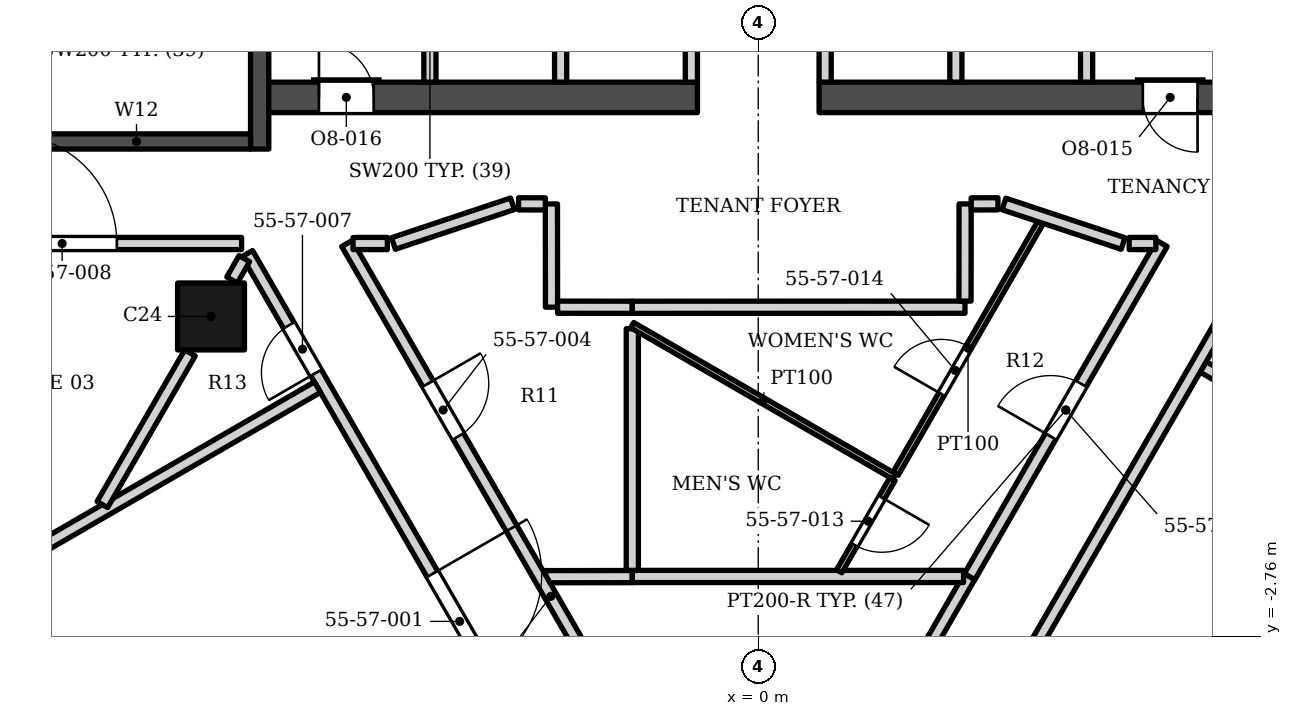
"""IFC4 building model, lengths in metres.
Left out: names, types, materials, properties, quantities, classifications, styles, units other than length and angle.
Written with IfcOpenShell. Run it as: python <this file> out.ifc"""

import sys

from ifc_helpers import new_model, si_unit, direction, frame, frame_2d, origin, origin_2d, place, context, subcontext, project, spatial, rectangle, extrude, element, fill, save


model = new_model("IFC4")
c1 = context("Model", 3, precision=1e-05, world=origin(), true_north=direction((0.0, 1.0)))
c2 = subcontext(c1, "Body", "Model", "MODEL_VIEW")
j1 = project(units=[si_unit("LENGTHUNIT", "METRE"), si_unit("PLANEANGLEUNIT", "RADIAN")], contexts=[c1])
p1 = place(None, origin())
s1 = spatial("IfcSite", under=j1, at=p1, CompositionType="ELEMENT")
p2 = place(p1, origin())
s2 = spatial("IfcBuilding", under=s1, at=p2, CompositionType="ELEMENT")
p3 = place(p2, frame((0.0, 0.0, 231.5)))
s3 = spatial("IfcBuildingStorey", under=s2, at=p3, CompositionType="ELEMENT", Elevation=231.5)
p4 = place(p3, frame((-8.2, 5.253, 0.0), z_axis=(0.0, 0.0, 1.0), x_axis=(0.0, 1.0, 0.0)))
e1 = element("IfcWall", 1, at=p4, inside=s3, PredefinedType="SHEAR", context=c2, shape_type="SweptSolid", body=[
    extrude(rectangle(XDim=13.3, YDim=0.3, at=frame_2d((6.65, 0.0))), origin(), (0.0, 0.0, 1.0), 3.9),
])
p5 = place(p4, frame((7.1, 0.0, 0.0)))
e2 = element("IfcOpeningElement", 2, at=p5, cuts=e1, PredefinedType="OPENING", context=c2, shape_type="SweptSolid", body=[
    extrude(rectangle(XDim=1.4, YDim=2.1, at=frame_2d((0.7, 1.05))), frame((0.0, 0.16, 0.0), z_axis=(0.0, -1.0, 0.0), x_axis=(1.0, 0.0, 0.0)), (0.0, 0.0, 1.0), 0.32),
])
p6 = place(p4, frame((5.05, 0.0, 0.0)))
e3 = element("IfcOpeningElement", 3, at=p6, cuts=e1, PredefinedType="OPENING", context=c2, shape_type="SweptSolid", body=[
    extrude(rectangle(XDim=1.4, YDim=2.1, at=frame_2d((0.7, 1.05))), frame((0.0, 0.16, 0.0), z_axis=(0.0, -1.0, 0.0), x_axis=(1.0, 0.0, 0.0)), (0.0, 0.0, 1.0), 0.32),
])
p7 = place(p3, frame((-12.1, 5.378, 0.0), z_axis=(0.0, 0.0, 1.0), x_axis=(1.0, 0.0, 0.0)))
e4 = element("IfcWall", 4, at=p7, inside=s3, PredefinedType="SHEAR", context=c2, shape_type="SweptSolid", body=[
    extrude(rectangle(XDim=3.75, YDim=0.25, at=frame_2d((1.875, 0.0))), origin(), (0.0, 0.0, 1.0), 3.9),
])
p8 = place(p3, frame((-8.05, 6.103, 0.0), z_axis=(0.0, 0.0, 1.0), x_axis=(1.0, 0.0, 0.0)))
e5 = element("IfcWall", 5, at=p8, inside=s3, PredefinedType="SHEAR", context=c2, shape_type="SweptSolid", body=[
    extrude(rectangle(XDim=7.05, YDim=0.5, at=frame_2d((3.525, 0.0))), origin(), (0.0, 0.0, 1.0), 3.9),
])
p9 = place(p8, frame((0.825, 0.0, 0.0)))
e6 = element("IfcOpeningElement", 6, at=p9, cuts=e5, PredefinedType="OPENING", context=c2, shape_type="SweptSolid", body=[
    extrude(rectangle(XDim=0.9, YDim=2.1, at=frame_2d((0.45, 1.05))), frame((0.0, 0.26, 0.0), z_axis=(0.0, -1.0, 0.0), x_axis=(1.0, 0.0, 0.0)), (0.0, 0.0, 1.0), 0.52),
])
p10 = place(p3, frame((1.0, 6.103, 0.0), z_axis=(0.0, 0.0, 1.0), x_axis=(1.0, 0.0, 0.0)))
e7 = element("IfcWall", 7, at=p10, inside=s3, PredefinedType="SHEAR", context=c2, shape_type="SweptSolid", body=[
    extrude(rectangle(XDim=7.05, YDim=0.5, at=frame_2d((3.525, 0.0))), origin(), (0.0, 0.0, 1.0), 3.9),
])
p11 = place(p10, frame((5.325, 0.0, 0.0)))
e8 = element("IfcOpeningElement", 8, at=p11, cuts=e7, PredefinedType="OPENING", context=c2, shape_type="SweptSolid", body=[
    extrude(rectangle(XDim=0.9, YDim=2.1, at=frame_2d((0.45, 1.05))), frame((0.0, 0.26, 0.0), z_axis=(0.0, -1.0, 0.0), x_axis=(1.0, 0.0, 0.0)), (0.0, 0.0, 1.0), 0.52),
])
p12 = place(p3, frame((-9.0, 2.5, 0.0), z_axis=(0.0, 0.0, 1.0), x_axis=(1.0, 0.0, 0.0)))
e9 = element("IfcColumn", 9, at=p12, inside=s3, PredefinedType="COLUMN", context=c2, shape_type="SweptSolid", body=[
    extrude(rectangle(XDim=1.1, YDim=1.1, at=origin_2d()), origin(), (0.0, 0.0, 1.0), 3.9),
])
p13 = place(p3, frame((-12.973, -2.146, 0.0), z_axis=(0.0, 0.0, 1.0), x_axis=(0.500002543286, -0.866023935413, 0.0)))
e10 = element("IfcWall", 10, at=p13, inside=s3, PredefinedType="ELEMENTEDWALL", context=c2, shape_type="SweptSolid", body=[
    extrude(rectangle(XDim=4.2, YDim=0.2, at=frame_2d((2.1, 0.0))), origin(), (0.0, 0.0, 1.0), 2.974),
])
p14 = place(p13, frame((0.2, 0.0, 0.45)))
e11 = element("IfcOpeningElement", 11, at=p14, cuts=e10, PredefinedType="OPENING", context=c2, shape_type="SweptSolid", body=[
    extrude(rectangle(XDim=2.4, YDim=2.25, at=frame_2d((1.2, 1.125))), frame((0.0, 0.11, 0.0), z_axis=(0.0, -1.0, 0.0), x_axis=(1.0, 0.0, 0.0)), (0.0, 0.0, 1.0), 0.22),
])
p15 = place(p13, frame((2.8, 0.0, 0.0)))
e12 = element("IfcOpeningElement", 12, at=p15, cuts=e10, PredefinedType="OPENING", context=c2, shape_type="SweptSolid", body=[
    extrude(rectangle(XDim=1.2, YDim=2.7, at=frame_2d((0.6, 1.35))), frame((0.0, 0.11, 0.0), z_axis=(0.0, -1.0, 0.0), x_axis=(1.0, 0.0, 0.0)), (0.0, 0.0, 1.0), 0.22),
])
for number, where, z_axis, x_axis in (
    (13, (-5.4, 6.353, 0.0), (0.0, 0.0, 1.0), (0.0, 1.0, 0.0)),
    (14, (-3.25, 6.353, 0.0), (0.0, 0.0, 1.0), (0.0, 1.0, 0.0)),
    (15, (-1.1, 6.353, 0.0), (0.0, 0.0, 1.0), (0.0, 1.0, 0.0)),
    (16, (1.1, 6.353, 0.0), (0.0, 0.0, 1.0), (0.0, 1.0, 0.0)),
    (17, (3.25, 6.353, 0.0), (0.0, 0.0, 1.0), (0.0, 1.0, 0.0)),
    (18, (5.4, 6.353, 0.0), (0.0, 0.0, 1.0), (0.0, 1.0, 0.0)),
):
    element("IfcWall", number, at=place(p3, frame(where, z_axis=z_axis, x_axis=x_axis)), inside=s3, PredefinedType="SOLIDWALL", context=c2, shape_type="SweptSolid", body=[
        extrude(rectangle(XDim=2.5, YDim=0.2, at=frame_2d((1.25, 0.0))), origin(), (0.0, 0.0, 1.0), 3.73),
    ])
p16 = place(p3, frame((-8.403, 3.534, 0.0), z_axis=(0.0, 0.0, 1.0), x_axis=(0.499994899308, -0.86602834865, 0.0)))
e19 = element("IfcWall", 19, at=p16, inside=s3, PredefinedType="PARTITIONING", context=c2, shape_type="SweptSolid", body=[
    extrude(rectangle(XDim=16.677, YDim=0.2, at=frame_2d((8.339, 0.0))), origin(), (0.0, 0.0, 1.0), 2.742),
])
p17 = place(p16, frame((6.084, 0.0, 0.0)))
e20 = element("IfcOpeningElement", 20, at=p17, cuts=e19, PredefinedType="OPENING", context=c2, shape_type="SweptSolid", body=[
    extrude(rectangle(XDim=1.8, YDim=2.4, at=frame_2d((0.9, 1.2))), frame((0.0, 0.11, 0.0), z_axis=(0.0, -1.0, 0.0), x_axis=(1.0, 0.0, 0.0)), (0.0, 0.0, 1.0), 0.22),
])
p18 = place(p16, frame((13.285, 0.0, 0.0)))
e21 = element("IfcOpeningElement", 21, at=p18, cuts=e19, PredefinedType="OPENING", context=c2, shape_type="SweptSolid", body=[
    extrude(rectangle(XDim=0.9, YDim=2.1, at=frame_2d((0.45, 1.05))), frame((0.0, 0.11, 0.0), z_axis=(0.0, -1.0, 0.0), x_axis=(1.0, 0.0, 0.0)), (0.0, 0.0, 1.0), 0.22),
])
p19 = place(p16, frame((1.364, 0.0, 0.0)))
e22 = element("IfcOpeningElement", 22, at=p19, cuts=e19, PredefinedType="OPENING", context=c2, shape_type="SweptSolid", body=[
    extrude(rectangle(XDim=0.9, YDim=2.1, at=frame_2d((0.45, 1.05))), frame((0.0, 0.11, 0.0), z_axis=(0.0, -1.0, 0.0), x_axis=(1.0, 0.0, 0.0)), (0.0, 0.0, 1.0), 0.22),
])
p20 = place(p3, frame((-0.013, -7.821, 0.0), z_axis=(0.0, 0.0, 1.0), x_axis=(0.499774962009, 0.866155290551, 0.0)))
e23 = element("IfcWall", 23, at=p20, inside=s3, PredefinedType="PARTITIONING", context=c2, shape_type="SweptSolid", body=[
    extrude(rectangle(XDim=6.977, YDim=0.2, at=frame_2d((3.488, 0.0))), origin(), (0.0, 0.0, 1.0), 2.742),
])
p21 = place(p20, frame((2.989, 0.0, 0.0)))
e24 = element("IfcOpeningElement", 24, at=p21, cuts=e23, PredefinedType="OPENING", context=c2, shape_type="SweptSolid", body=[
    extrude(rectangle(XDim=0.9, YDim=2.1, at=frame_2d((0.45, 1.05))), frame((0.0, 0.11, 0.0), z_axis=(0.0, -1.0, 0.0), x_axis=(1.0, 0.0, 0.0)), (0.0, 0.0, 1.0), 0.22),
])
p22 = place(p3, frame((-12.659, -1.791, 0.0), z_axis=(0.0, 0.0, 1.0), x_axis=(0.865661558062, 0.500629670408, 0.0)))
e25 = element("IfcWall", 25, at=p22, inside=s3, PredefinedType="PARTITIONING", context=c2, shape_type="SweptSolid", body=[
    extrude(rectangle(XDim=6.25, YDim=0.2, at=frame_2d((3.125, 0.0))), origin(), (0.0, 0.0, 1.0), 2.884),
])
p23 = place(p3, frame((-3.499, -1.78, 0.0), z_axis=(0.0, 0.0, 1.0), x_axis=(0.999999471866, 0.001027748686, 0.0)))
e26 = element("IfcWall", 26, at=p23, inside=s3, PredefinedType="PARTITIONING", context=c2, shape_type="SweptSolid", body=[
    extrude(rectangle(XDim=1.425, YDim=0.2, at=frame_2d((0.713, 0.0))), origin(), (0.0, 0.0, 1.0), 3.73),
])
p24 = place(p3, frame((-2.071, -1.776, 0.0), z_axis=(0.0, 0.0, 1.0), x_axis=(1.0, 0.0, 0.0)))
e27 = element("IfcWall", 27, at=p24, inside=s3, PredefinedType="PARTITIONING", context=c2, shape_type="SweptSolid", body=[
    extrude(rectangle(XDim=5.448, YDim=0.2, at=frame_2d((2.724, 0.0))), origin(), (0.0, 0.0, 1.0), 2.742),
])
p25 = place(p3, frame((3.476, -1.778, 0.0), z_axis=(0.0, 0.0, 1.0), x_axis=(0.500016482634, 0.866015887322, 0.0)))
e28 = element("IfcWall", 28, at=p25, inside=s3, PredefinedType="PARTITIONING", context=c2, shape_type="SweptSolid", body=[
    extrude(rectangle(XDim=6.325, YDim=0.2, at=frame_2d((3.163, 0.0))), origin(), (0.0, 0.0, 1.0), 2.742),
])
p26 = place(p25, frame((2.663, 0.0, 0.0)))
e29 = element("IfcOpeningElement", 29, at=p26, cuts=e28, PredefinedType="OPENING", context=c2, shape_type="SweptSolid", body=[
    extrude(rectangle(XDim=1.0, YDim=2.1, at=frame_2d((0.5, 1.05))), frame((0.0, 0.11, 0.0), z_axis=(0.0, -1.0, 0.0), x_axis=(1.0, 0.0, 0.0)), (0.0, 0.0, 1.0), 0.22),
])
p27 = place(p3, frame((7.316, 1.671, 0.0), z_axis=(0.0, 0.0, 1.0), x_axis=(0.866023543838, -0.500003221507, 0.0)))
e30 = element("IfcWall", 30, at=p27, inside=s3, PredefinedType="PARTITIONING", context=c2, shape_type="SweptSolid", body=[
    extrude(rectangle(XDim=6.85, YDim=0.2, at=frame_2d((3.425, 0.0))), origin(), (0.0, 0.0, 1.0), 2.884),
])
p28 = place(p3, frame((1.331, -1.691, 0.0), z_axis=(0.0, 0.0, 1.0), x_axis=(0.500723196883, 0.865607463059, 0.0)))
e31 = element("IfcWall", 31, at=p28, inside=s3, PredefinedType="PARTITIONING", context=c2, shape_type="SweptSolid", body=[
    extrude(rectangle(XDim=1.752, YDim=0.1, at=frame_2d((0.876, 0.0))), origin(), (0.0, 0.0, 1.0), 2.742),
])
p29 = place(p28, frame((0.502, 0.0, 0.0)))
e32 = element("IfcOpeningElement", 32, at=p29, cuts=e31, PredefinedType="OPENING", context=c2, shape_type="SweptSolid", body=[
    extrude(rectangle(XDim=0.9, YDim=2.1, at=frame_2d((0.45, 1.05))), frame((0.0, 0.06, 0.0), z_axis=(0.0, -1.0, 0.0), x_axis=(1.0, 0.0, 0.0)), (0.0, 0.0, 1.0), 0.12),
])
p30 = place(p3, frame((-10.787, -0.594, 0.0), z_axis=(0.0, 0.0, 1.0), x_axis=(0.500287485194, 0.865859360496, 0.0)))
e33 = element("IfcWall", 33, at=p30, inside=s3, PredefinedType="PARTITIONING", context=c2, shape_type="SweptSolid", body=[
    extrude(rectangle(XDim=2.88, YDim=0.2, at=frame_2d((1.44, 0.0))), origin(), (0.0, 0.0, 1.0), 3.73),
])
p31 = place(p3, frame((2.258, -0.087, 0.0), z_axis=(0.0, 0.0, 1.0), x_axis=(0.499684056676, 0.866207736922, 0.0)))
e34 = element("IfcWall", 34, at=p31, inside=s3, PredefinedType="PARTITIONING", context=c2, shape_type="SweptSolid", body=[
    extrude(rectangle(XDim=4.771, YDim=0.1, at=frame_2d((2.385, 0.0))), origin(), (0.0, 0.0, 1.0), 2.742),
])
p32 = place(p31, frame((1.513, 0.0, 0.0)))
e35 = element("IfcOpeningElement", 35, at=p32, cuts=e34, PredefinedType="OPENING", context=c2, shape_type="SweptSolid", body=[
    extrude(rectangle(XDim=0.9, YDim=2.1, at=frame_2d((0.45, 1.05))), frame((0.0, 0.06, 0.0), z_axis=(0.0, -1.0, 0.0), x_axis=(1.0, 0.0, 0.0)), (0.0, 0.0, 1.0), 0.12),
])
p33 = place(p3, frame((-2.071, -1.676, 0.0), z_axis=(0.0, 0.0, 1.0), x_axis=(0.0, 1.0, 0.0)))
e36 = element("IfcWall", 36, at=p33, inside=s3, PredefinedType="PARTITIONING", context=c2, shape_type="SweptSolid", body=[
    extrude(rectangle(XDim=3.975, YDim=0.2, at=frame_2d((1.987, 0.0))), origin(), (0.0, 0.0, 1.0), 2.742),
])
p34 = place(p3, frame((-2.073, 2.357, 0.0), z_axis=(0.0, 0.0, 1.0), x_axis=(0.865852787501, -0.500298861059, 0.0)))
e37 = element("IfcWall", 37, at=p34, inside=s3, PredefinedType="PARTITIONING", context=c2, shape_type="SweptSolid", body=[
    extrude(rectangle(XDim=4.974, YDim=0.1, at=frame_2d((2.487, 0.0))), origin(), (0.0, 0.0, 1.0), 2.742),
])
p35 = place(p3, frame((-3.402, 4.351, 0.0), z_axis=(0.0, 0.0, 1.0), x_axis=(0.001150085496, -0.999999338651, 0.0)))
e38 = element("IfcWall", 38, at=p35, inside=s3, PredefinedType="PARTITIONING", context=c2, shape_type="SweptSolid", body=[
    extrude(rectangle(XDim=1.698, YDim=0.2, at=frame_2d((0.849, 0.0))), origin(), (0.0, 0.0, 1.0), 3.73),
])
p36 = place(p3, frame((-3.3, 2.652, 0.0), z_axis=(0.0, 0.0, 1.0), x_axis=(0.999999030114, -0.001392756309, 0.0)))
e39 = element("IfcWall", 39, at=p36, inside=s3, PredefinedType="PARTITIONING", context=c2, shape_type="SweptSolid", body=[
    extrude(rectangle(XDim=1.227, YDim=0.2, at=frame_2d((0.614, 0.0))), origin(), (0.0, 0.0, 1.0), 3.73),
])
p37 = place(p3, frame((-2.071, 2.651, 0.0), z_axis=(0.0, 0.0, 1.0), x_axis=(0.99999995122, 0.0003123466, 0.0)))
e40 = element("IfcWall", 40, at=p37, inside=s3, PredefinedType="PARTITIONING", context=c2, shape_type="SweptSolid", body=[
    extrude(rectangle(XDim=5.471, YDim=0.2, at=frame_2d((2.736, 0.0))), origin(), (0.0, 0.0, 1.0), 3.73),
])
p38 = place(p3, frame((-8.654, 3.1, 0.0), z_axis=(0.0, 0.0, 1.0), x_axis=(0.497766425922, 0.86731112366, 0.0)))
e41 = element("IfcWall", 41, at=p38, inside=s3, PredefinedType="PARTITIONING", context=c2, shape_type="SweptSolid", body=[
    extrude(rectangle(XDim=0.404, YDim=0.2, at=frame_2d((0.202, 0.0))), origin(), (0.0, 0.0, 1.0), 3.73),
])
p39 = place(p3, frame((-14.4, 3.699, 0.0), z_axis=(0.0, 0.0, 1.0), x_axis=(1.0, 0.0, 0.0)))
e42 = element("IfcWall", 42, at=p39, inside=s3, PredefinedType="PARTITIONING", context=c2, shape_type="SweptSolid", body=[
    extrude(rectangle(XDim=5.903, YDim=0.2, at=frame_2d((2.952, 0.0))), origin(), (0.0, 0.0, 1.0), 2.974),
])
p40 = place(p39, frame((2.052, 0.0, 0.0)))
e43 = element("IfcOpeningElement", 43, at=p40, cuts=e42, PredefinedType="OPENING", context=c2, shape_type="SweptSolid", body=[
    extrude(rectangle(XDim=1.8, YDim=2.4, at=frame_2d((0.9, 1.2))), frame((0.0, 0.11, 0.0), z_axis=(0.0, -1.0, 0.0), x_axis=(1.0, 0.0, 0.0)), (0.0, 0.0, 1.0), 0.22),
])
p41 = place(p3, frame((-6.764, 3.7, 0.0), z_axis=(0.0, 0.0, 1.0), x_axis=(0.500260603275, -0.865874892124, 0.0)))
e44 = element("IfcWall", 44, at=p41, inside=s3, PredefinedType="PARTITIONING", context=c2, shape_type="SweptSolid", body=[
    extrude(rectangle(XDim=13.403, YDim=0.2, at=frame_2d((6.702, 0.0))), origin(), (0.0, 0.0, 1.0), 2.742),
])
p42 = place(p41, frame((2.663, 0.0, 0.0)))
e45 = element("IfcOpeningElement", 45, at=p42, cuts=e44, PredefinedType="OPENING", context=c2, shape_type="SweptSolid", body=[
    extrude(rectangle(XDim=1.0, YDim=2.1, at=frame_2d((0.5, 1.05))), frame((0.0, 0.11, 0.0), z_axis=(0.0, -1.0, 0.0), x_axis=(1.0, 0.0, 0.0)), (0.0, 0.0, 1.0), 0.22),
])
p43 = place(p3, frame((-6.664, 3.7, 0.0), z_axis=(0.0, 0.0, 1.0), x_axis=(1.0, 0.0, 0.0)))
e46 = element("IfcWall", 46, at=p43, inside=s3, PredefinedType="PARTITIONING", context=c2, shape_type="SweptSolid", body=[
    extrude(rectangle(XDim=0.564, YDim=0.2, at=frame_2d((0.282, 0.0))), origin(), (0.0, 0.0, 1.0), 2.742),
])
p44 = place(p3, frame((4.042, 4.35, 0.0), z_axis=(0.0, 0.0, 1.0), x_axis=(0.949072993984, -0.315056268135, 0.0)))
e47 = element("IfcWall", 47, at=p44, inside=s3, PredefinedType="PARTITIONING", context=c2, shape_type="SweptSolid", body=[
    extrude(rectangle(XDim=2.063, YDim=0.2, at=frame_2d((1.032, 0.0))), origin(), (0.0, 0.0, 1.0), 2.742),
])
p45 = place(p3, frame((6.1, 3.7, 0.0), z_axis=(0.0, 0.0, 1.0), x_axis=(1.0, 0.0, 0.0)))
e48 = element("IfcWall", 48, at=p45, inside=s3, PredefinedType="PARTITIONING", context=c2, shape_type="SweptSolid", body=[
    extrude(rectangle(XDim=0.439, YDim=0.2, at=frame_2d((0.219, 0.0))), origin(), (0.0, 0.0, 1.0), 3.73),
])
p46 = place(p3, frame((0.48, -9.972, 0.0), z_axis=(0.0, 0.0, 1.0), x_axis=(0.499998248741, 0.866026414872, 0.0)))
e49 = element("IfcWall", 49, at=p46, inside=s3, PredefinedType="PARTITIONING", context=c2, shape_type="SweptSolid", body=[
    extrude(rectangle(XDim=15.785, YDim=0.2, at=frame_2d((7.893, 0.0))), origin(), (0.0, 0.0, 1.0), 2.742),
])
p47 = place(p46, frame((5.85, 0.0, 0.0)))
e50 = element("IfcOpeningElement", 50, at=p47, cuts=e49, PredefinedType="OPENING", context=c2, shape_type="SweptSolid", body=[
    extrude(rectangle(XDim=1.8, YDim=2.4, at=frame_2d((0.9, 1.2))), frame((0.0, 0.11, 0.0), z_axis=(0.0, -1.0, 0.0), x_axis=(1.0, 0.0, 0.0)), (0.0, 0.0, 1.0), 0.22),
])
p48 = place(p3, frame((-6.0, 3.7, 0.0), z_axis=(0.0, 0.0, 1.0), x_axis=(0.948683298051, 0.316227766017, 0.0)))
e51 = element("IfcWall", 51, at=p48, inside=s3, PredefinedType="PARTITIONING", context=c2, shape_type="SweptSolid", body=[
    extrude(rectangle(XDim=2.064, YDim=0.2, at=frame_2d((1.032, 0.0))), origin(), (0.0, 0.0, 1.0), 2.742),
])
p49 = place(p3, frame((-3.942, 4.352, 0.0), z_axis=(0.0, 0.0, 1.0), x_axis=(0.999996159087, -0.00277160798, 0.0)))
e52 = element("IfcWall", 52, at=p49, inside=s3, PredefinedType="PARTITIONING", context=c2, shape_type="SweptSolid", body=[
    extrude(rectangle(XDim=0.44, YDim=0.2, at=frame_2d((0.22, 0.0))), origin(), (0.0, 0.0, 1.0), 3.73),
])
p50 = place(p3, frame((3.4, 2.752, 0.0), z_axis=(0.0, 0.0, 1.0), x_axis=(0.001222119466, 0.999999253212, 0.0)))
e53 = element("IfcWall", 53, at=p50, inside=s3, PredefinedType="PARTITIONING", context=c2, shape_type="SweptSolid", body=[
    extrude(rectangle(XDim=1.598, YDim=0.2, at=frame_2d((0.799, 0.0))), origin(), (0.0, 0.0, 1.0), 3.73),
])
p51 = place(p3, frame((3.502, 4.351, 0.0), z_axis=(0.0, 0.0, 1.0), x_axis=(0.999996159087, 0.00277160798, 0.0)))
e54 = element("IfcWall", 54, at=p51, inside=s3, PredefinedType="PARTITIONING", context=c2, shape_type="SweptSolid", body=[
    extrude(rectangle(XDim=0.44, YDim=0.2, at=frame_2d((0.22, 0.0))), origin(), (0.0, 0.0, 1.0), 3.73),
])
p52 = place(p9, origin())
e55 = element("IfcDoor", 55, at=p52, inside=s3, OperationType="SINGLE_SWING_LEFT", PredefinedType="DOOR", context=c2, shape_type="SweptSolid", body=[
    extrude(rectangle(XDim=0.9, YDim=2.1, at=frame_2d((0.45, 1.05))), frame((0.0, 0.025, 0.0), z_axis=(0.0, -1.0, 0.0), x_axis=(1.0, 0.0, 0.0)), (0.0, 0.0, 1.0), 0.05),
])
fill(e6, e55)
p53 = place(p11, origin())
e56 = element("IfcDoor", 56, at=p53, inside=s3, OperationType="SINGLE_SWING_RIGHT", PredefinedType="DOOR", context=c2, shape_type="SweptSolid", body=[
    extrude(rectangle(XDim=0.9, YDim=2.1, at=frame_2d((0.45, 1.05))), frame((0.0, 0.025, 0.0), z_axis=(0.0, -1.0, 0.0), x_axis=(1.0, 0.0, 0.0)), (0.0, 0.0, 1.0), 0.05),
])
fill(e8, e56)
p54 = place(p17, origin())
e57 = element("IfcDoor", 57, at=p54, inside=s3, OperationType="DOUBLE_DOOR_SINGLE_SWING", PredefinedType="DOOR", context=c2, shape_type="SweptSolid", body=[
    extrude(rectangle(XDim=1.8, YDim=2.4, at=frame_2d((0.9, 1.2))), frame((0.0, 0.025, 0.0), z_axis=(0.0, -1.0, 0.0), x_axis=(1.0, 0.0, 0.0)), (0.0, 0.0, 1.0), 0.05),
])
fill(e20, e57)
p55 = place(p42, origin())
e58 = element("IfcDoor", 58, at=p55, inside=s3, OperationType="SINGLE_SWING_LEFT", PredefinedType="DOOR", context=c2, shape_type="SweptSolid", body=[
    extrude(rectangle(XDim=1.0, YDim=2.1, at=frame_2d((0.5, 1.05))), frame((0.0, 0.025, 0.0), z_axis=(0.0, -1.0, 0.0), x_axis=(1.0, 0.0, 0.0)), (0.0, 0.0, 1.0), 0.05),
])
fill(e45, e58)
p56 = place(p19, origin())
e59 = element("IfcDoor", 59, at=p56, inside=s3, OperationType="SINGLE_SWING_RIGHT", PredefinedType="DOOR", context=c2, shape_type="SweptSolid", body=[
    extrude(rectangle(XDim=0.9, YDim=2.1, at=frame_2d((0.45, 1.05))), frame((0.0, 0.025, 0.0), z_axis=(0.0, -1.0, 0.0), x_axis=(1.0, 0.0, 0.0)), (0.0, 0.0, 1.0), 0.05),
])
fill(e22, e59)
p57 = place(p40, origin())
e60 = element("IfcDoor", 60, at=p57, inside=s3, OperationType="DOUBLE_DOOR_SINGLE_SWING", PredefinedType="DOOR", context=c2, shape_type="SweptSolid", body=[
    extrude(rectangle(XDim=1.8, YDim=2.4, at=frame_2d((0.9, 1.2))), frame((0.0, 0.025, 0.0), z_axis=(0.0, -1.0, 0.0), x_axis=(1.0, 0.0, 0.0)), (0.0, 0.0, 1.0), 0.05),
])
fill(e43, e60)
p58 = place(p26, origin())
e61 = element("IfcDoor", 61, at=p58, inside=s3, OperationType="SINGLE_SWING_LEFT", PredefinedType="DOOR", context=c2, shape_type="SweptSolid", body=[
    extrude(rectangle(XDim=1.0, YDim=2.1, at=frame_2d((0.5, 1.05))), frame((0.0, 0.025, 0.0), z_axis=(0.0, -1.0, 0.0), x_axis=(1.0, 0.0, 0.0)), (0.0, 0.0, 1.0), 0.05),
])
fill(e29, e61)
p59 = place(p29, origin())
e62 = element("IfcDoor", 62, at=p59, inside=s3, OperationType="SINGLE_SWING_RIGHT", PredefinedType="DOOR", context=c2, shape_type="SweptSolid", body=[
    extrude(rectangle(XDim=0.9, YDim=2.1, at=frame_2d((0.45, 1.05))), frame((0.0, 0.025, 0.0), z_axis=(0.0, -1.0, 0.0), x_axis=(1.0, 0.0, 0.0)), (0.0, 0.0, 1.0), 0.05),
])
fill(e32, e62)
p60 = place(p32, origin())
e63 = element("IfcDoor", 63, at=p60, inside=s3, OperationType="SINGLE_SWING_LEFT", PredefinedType="DOOR", context=c2, shape_type="SweptSolid", body=[
    extrude(rectangle(XDim=0.9, YDim=2.1, at=frame_2d((0.45, 1.05))), frame((0.0, 0.025, 0.0), z_axis=(0.0, -1.0, 0.0), x_axis=(1.0, 0.0, 0.0)), (0.0, 0.0, 1.0), 0.05),
])
fill(e35, e63)
save(model, sys.argv[1])
